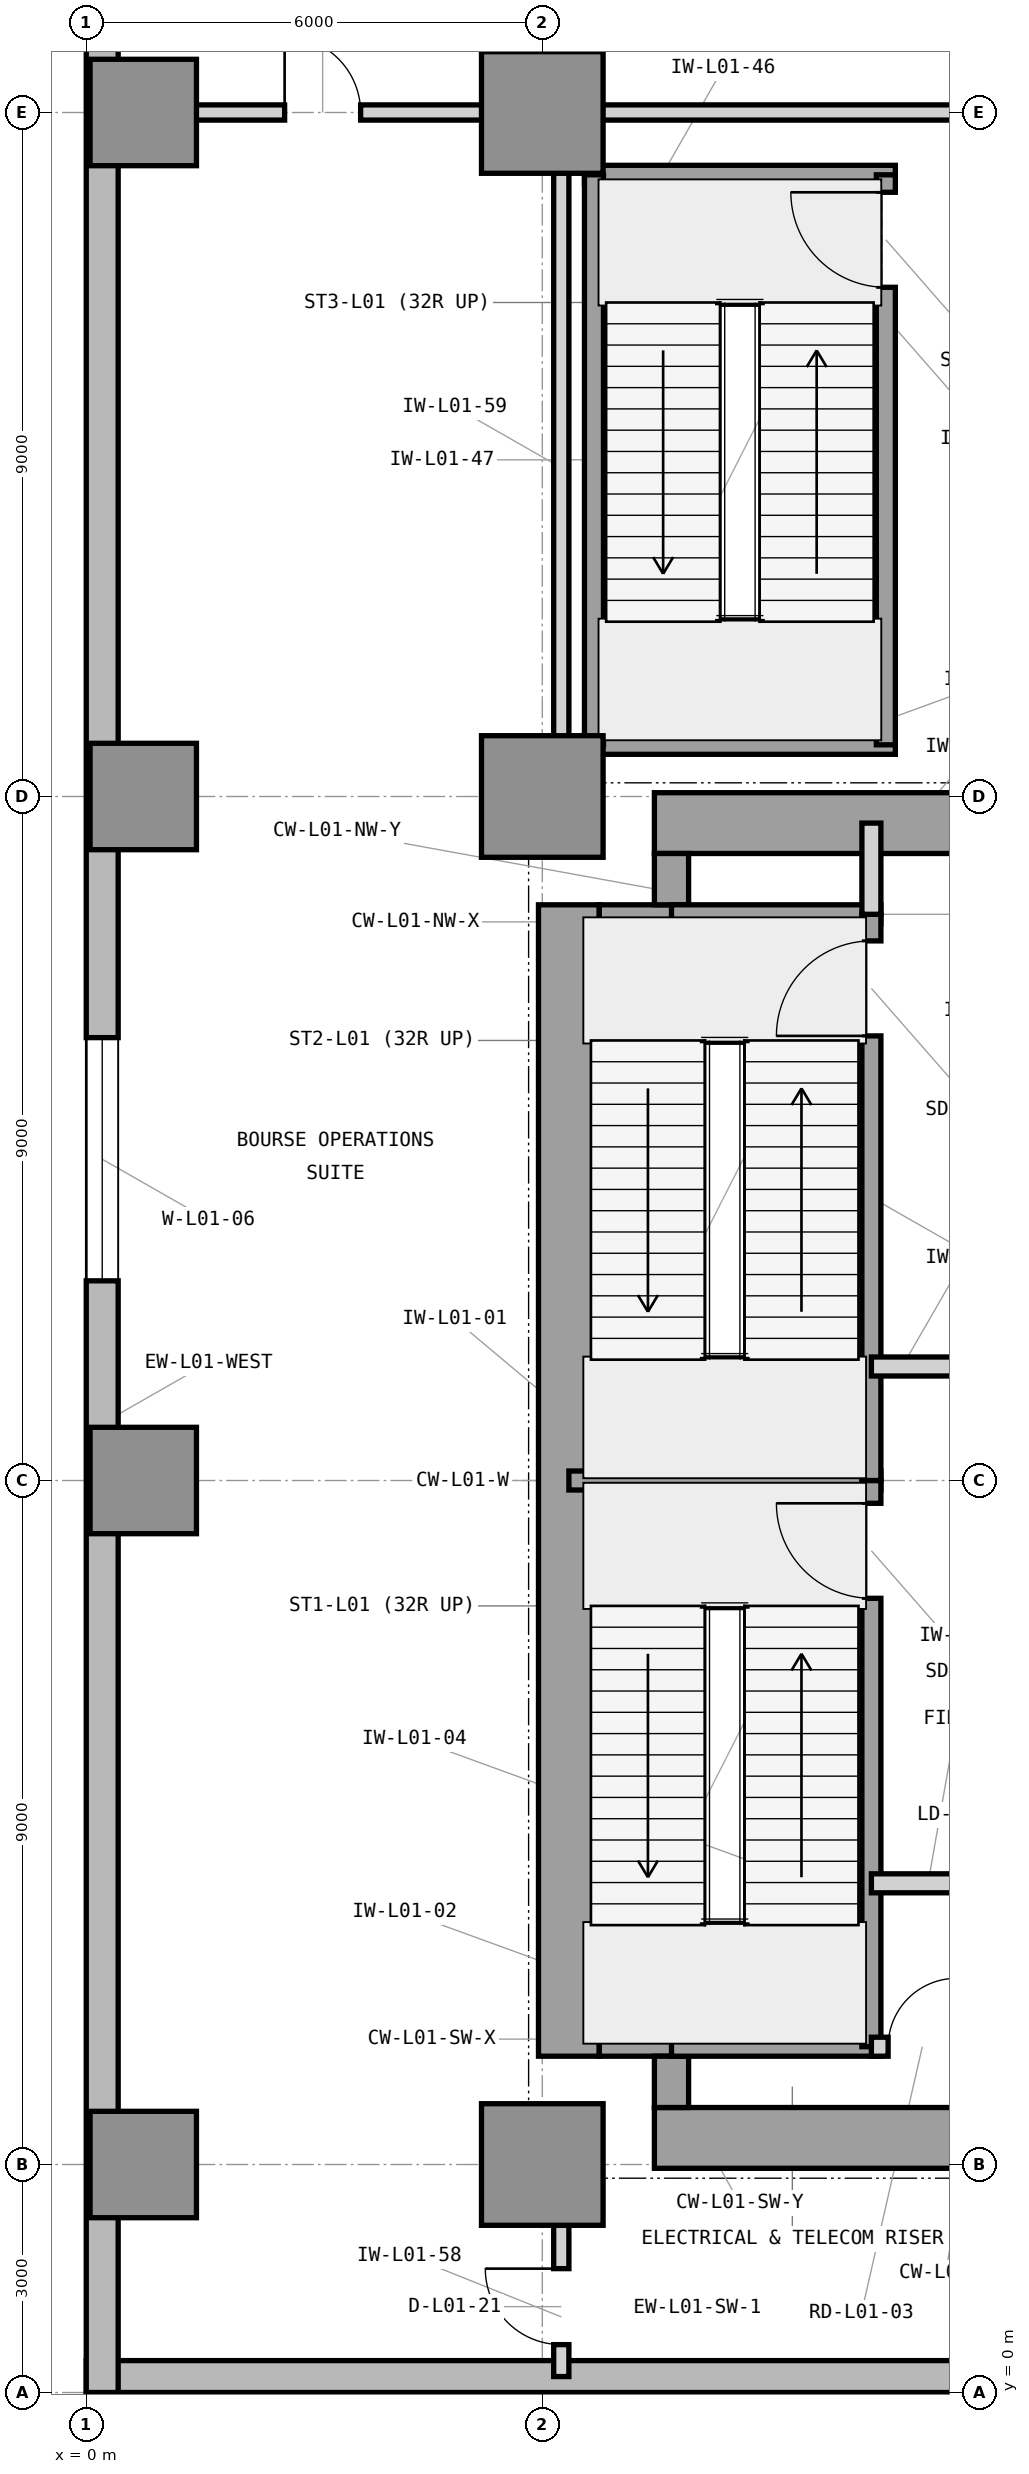
"""IFC4 building model, lengths in metres.
Left out: names, types, materials, properties, quantities, classifications, styles, units other than length and angle.
Written with IfcOpenShell. Run it as: python <this file> out.ifc"""

import sys

from ifc_helpers import new_model, si_unit, direction, frame, frame_2d, origin, origin_2d, place, context, subcontext, project, spatial, rectangle, extrude, element, fill, save


model = new_model("IFC4")
c1 = context("Model", 3, precision=1e-05, world=origin(), true_north=direction((0.0, 1.0)))
c2 = subcontext(c1, "Body", "Model", "MODEL_VIEW")
j1 = project(units=[si_unit("LENGTHUNIT", "METRE"), si_unit("PLANEANGLEUNIT", "RADIAN")], contexts=[c1])
p1 = place(None, origin())
s1 = spatial("IfcSite", under=j1, at=p1, CompositionType="ELEMENT")
p2 = place(p1, origin())
s2 = spatial("IfcBuilding", under=s1, at=p2, CompositionType="ELEMENT")
p3 = place(p2, frame((0.0, 0.0, 5.4)))
s3 = spatial("IfcBuildingStorey", under=s2, at=p3, CompositionType="ELEMENT", Elevation=5.4)
p4 = place(p3, frame((7.475, 3.35, 0.0), z_axis=(0.0, 0.0, 1.0), x_axis=(1.0, 0.0, 0.0)))
e1 = element("IfcWall", 1, at=p4, inside=s3, PredefinedType="SHEAR", context=c2, shape_type="SweptSolid", body=[
    extrude(rectangle(XDim=16.575, YDim=0.8, at=frame_2d((8.288, 0.0))), origin(), (0.0, 0.0, 1.0), 5.4),
])
p5 = place(p3, frame((6.35, 4.425, 0.0), z_axis=(0.0, 0.0, 1.0), x_axis=(0.0, 1.0, 0.0)))
e2 = element("IfcWall", 2, at=p5, inside=s3, PredefinedType="SHEAR", context=c2, shape_type="SweptSolid", body=[
    extrude(rectangle(XDim=15.15, YDim=0.8, at=frame_2d((7.575, 0.0))), origin(), (0.0, 0.0, 1.0), 5.4),
])
p6 = place(p3, frame((7.475, 20.65, 0.0), z_axis=(0.0, 0.0, 1.0), x_axis=(1.0, 0.0, 0.0)))
e3 = element("IfcWall", 3, at=p6, inside=s3, PredefinedType="SHEAR", context=c2, shape_type="SweptSolid", body=[
    extrude(rectangle(XDim=12.325, YDim=0.8, at=frame_2d((6.163, 0.0))), origin(), (0.0, 0.0, 1.0), 5.4),
])
p7 = place(p3, frame((6.75, 4.65, 0.0), z_axis=(0.0, 0.0, 1.0), x_axis=(1.0, 0.0, 0.0)))
e4 = element("IfcWall", 4, at=p7, inside=s3, PredefinedType="SHEAR", context=c2, shape_type="SweptSolid", body=[
    extrude(rectangle(XDim=1.175, YDim=0.45, at=frame_2d((0.587, 0.0))), origin(), (0.0, 0.0, 1.0), 5.4),
])
p8 = place(p3, frame((7.7, 3.75, 0.0), z_axis=(0.0, 0.0, 1.0), x_axis=(0.0, 1.0, 0.0)))
e5 = element("IfcWall", 5, at=p8, inside=s3, PredefinedType="SHEAR", context=c2, shape_type="SweptSolid", body=[
    extrude(rectangle(XDim=0.675, YDim=0.45, at=frame_2d((0.337, 0.0))), origin(), (0.0, 0.0, 1.0), 5.4),
])
p9 = place(p3, frame((6.75, 19.35, 0.0), z_axis=(0.0, 0.0, 1.0), x_axis=(1.0, 0.0, 0.0)))
e6 = element("IfcWall", 6, at=p9, inside=s3, PredefinedType="SHEAR", context=c2, shape_type="SweptSolid", body=[
    extrude(rectangle(XDim=1.175, YDim=0.45, at=frame_2d((0.587, 0.0))), origin(), (0.0, 0.0, 1.0), 5.4),
])
p10 = place(p3, frame((7.7, 19.575, 0.0), z_axis=(0.0, 0.0, 1.0), x_axis=(0.0, 1.0, 0.0)))
e7 = element("IfcWall", 7, at=p10, inside=s3, PredefinedType="SHEAR", context=c2, shape_type="SweptSolid", body=[
    extrude(rectangle(XDim=0.675, YDim=0.45, at=frame_2d((0.337, 0.0))), origin(), (0.0, 0.0, 1.0), 5.4),
])
for number, where, z_axis, x_axis in (
    (8, (0.75, 3.0, 0.0), (0.0, 0.0, 1.0), (1.0, 0.0, 0.0)),
    (9, (0.75, 12.0, 0.0), (0.0, 0.0, 1.0), (1.0, 0.0, 0.0)),
    (10, (0.75, 21.0, 0.0), (0.0, 0.0, 1.0), (1.0, 0.0, 0.0)),
    (11, (0.75, 30.0, 0.0), (0.0, 0.0, 1.0), (1.0, 0.0, 0.0)),
):
    element("IfcColumn", number, at=place(p3, frame(where, z_axis=z_axis, x_axis=x_axis)), inside=s3, PredefinedType="COLUMN", context=c2, shape_type="SweptSolid", body=[
        extrude(rectangle(XDim=1.4, YDim=1.4, at=origin_2d()), origin(), (0.0, 0.0, 1.0), 5.4),
    ])
for number, where, z_axis, x_axis in (
    (12, (6.0, 3.0, 0.0), (0.0, 0.0, 1.0), (1.0, 0.0, 0.0)),
    (13, (6.0, 21.0, 0.0), (0.0, 0.0, 1.0), (1.0, 0.0, 0.0)),
    (14, (6.0, 30.0, 0.0), (0.0, 0.0, 1.0), (1.0, 0.0, 0.0)),
):
    element("IfcColumn", number, at=place(p3, frame(where, z_axis=z_axis, x_axis=x_axis)), inside=s3, PredefinedType="COLUMN", context=c2, shape_type="SweptSolid", body=[
        extrude(rectangle(XDim=1.6, YDim=1.6, at=origin_2d()), origin(), (0.0, 0.0, 1.0), 5.4),
    ])
p11 = place(p3, frame((0.0, 0.21, 0.0), z_axis=(0.0, 0.0, 1.0), x_axis=(1.0, 0.0, 0.0)))
e15 = element("IfcWall", 15, at=p11, inside=s3, PredefinedType="STANDARD", context=c2, shape_type="SweptSolid", body=[
    extrude(rectangle(XDim=16.08, YDim=0.42, at=frame_2d((8.04, 0.0))), origin(), (0.0, 0.0, 1.0), 5.1),
])
p12 = place(p3, frame((0.21, 51.0, 0.0), z_axis=(0.0, 0.0, 1.0), x_axis=(0.0, -1.0, 0.0)))
e16 = element("IfcWall", 16, at=p12, inside=s3, PredefinedType="STANDARD", context=c2, shape_type="SweptSolid", body=[
    extrude(rectangle(XDim=51.0, YDim=0.42, at=frame_2d((25.5, 0.0))), origin(), (0.0, 0.0, 1.0), 5.1),
])
p13 = place(p12, frame((33.173, 0.0, 0.9)))
e17 = element("IfcOpeningElement", 17, at=p13, cuts=e16, PredefinedType="OPENING", context=c2, shape_type="SweptSolid", body=[
    extrude(rectangle(XDim=3.2, YDim=3.1, at=frame_2d((1.6, 1.55))), frame((0.0, 0.22, 0.0), z_axis=(0.0, -1.0, 0.0), x_axis=(1.0, 0.0, 0.0)), (0.0, 0.0, 1.0), 0.44),
])
p14 = place(p3, frame((6.35, 12.0, 0.0), z_axis=(0.0, 0.0, 1.0), x_axis=(1.0, 0.0, 0.0)))
e18 = element("IfcWall", 18, at=p14, inside=s3, PredefinedType="SHEAR", context=c2, shape_type="SweptSolid", body=[
    extrude(rectangle(XDim=4.105, YDim=0.25, at=frame_2d((2.052, 0.0))), origin(), (0.0, 0.0, 1.0), 5.4),
])
for number, where, z_axis, x_axis in (
    (19, (7.7, 4.55, 0.0), (0.0, 0.0, 1.0), (1.0, 0.0, 0.0)),
    (20, (7.7, 19.45, 0.0), (0.0, 0.0, 1.0), (1.0, 0.0, 0.0)),
):
    element("IfcWall", number, at=place(p3, frame(where, z_axis=z_axis, x_axis=x_axis)), inside=s3, PredefinedType="SHEAR", context=c2, shape_type="SweptSolid", body=[
        extrude(rectangle(XDim=2.755, YDim=0.25, at=frame_2d((1.377, 0.0))), origin(), (0.0, 0.0, 1.0), 5.4),
    ])
p15 = place(p3, frame((10.33, 4.55, 0.0), z_axis=(0.0, 0.0, 1.0), x_axis=(0.0, 1.0, 0.0)))
e21 = element("IfcWall", 21, at=p15, inside=s3, PredefinedType="SHEAR", context=c2, shape_type="SweptSolid", body=[
    extrude(rectangle(XDim=7.45, YDim=0.25, at=frame_2d((3.725, 0.0))), origin(), (0.0, 0.0, 1.0), 5.4),
])
p16 = place(p15, frame((5.9, 0.0, 0.0)))
e22 = element("IfcOpeningElement", 22, at=p16, cuts=e21, PredefinedType="OPENING", context=c2, shape_type="SweptSolid", body=[
    extrude(rectangle(XDim=1.25, YDim=2.2, at=frame_2d((0.625, 1.1))), frame((0.0, 0.135, 0.0), z_axis=(0.0, -1.0, 0.0), x_axis=(1.0, 0.0, 0.0)), (0.0, 0.0, 1.0), 0.27),
])
p17 = place(p3, frame((10.33, 12.0, 0.0), z_axis=(0.0, 0.0, 1.0), x_axis=(0.0, 1.0, 0.0)))
e23 = element("IfcWall", 23, at=p17, inside=s3, PredefinedType="SHEAR", context=c2, shape_type="SweptSolid", body=[
    extrude(rectangle(XDim=7.45, YDim=0.25, at=frame_2d((3.725, 0.0))), origin(), (0.0, 0.0, 1.0), 5.4),
])
p18 = place(p17, frame((5.85, 0.0, 0.0)))
e24 = element("IfcOpeningElement", 24, at=p18, cuts=e23, PredefinedType="OPENING", context=c2, shape_type="SweptSolid", body=[
    extrude(rectangle(XDim=1.25, YDim=2.2, at=frame_2d((0.625, 1.1))), frame((0.0, 0.135, 0.0), z_axis=(0.0, -1.0, 0.0), x_axis=(1.0, 0.0, 0.0)), (0.0, 0.0, 1.0), 0.27),
])
p19 = place(p3, frame((10.33, 4.55, 0.0), z_axis=(0.0, 0.0, 1.0), x_axis=(1.0, 0.0, 0.0)))
e25 = element("IfcWall", 25, at=p19, inside=s3, PredefinedType="PARTITIONING", context=c2, shape_type="SweptSolid", body=[
    extrude(rectangle(XDim=1.49, YDim=0.25, at=frame_2d((0.745, 0.0))), origin(), (0.0, 0.0, 1.0), 5.09),
])
p20 = place(p19, frame((0.22, 0.0, 0.0)))
e26 = element("IfcOpeningElement", 26, at=p20, cuts=e25, PredefinedType="OPENING", context=c2, shape_type="SweptSolid", body=[
    extrude(rectangle(XDim=0.9, YDim=2.1, at=frame_2d((0.45, 1.05))), frame((0.0, 0.135, 0.0), z_axis=(0.0, -1.0, 0.0), x_axis=(1.0, 0.0, 0.0)), (0.0, 0.0, 1.0), 0.27),
])
p21 = place(p3, frame((10.33, 19.45, 0.0), z_axis=(0.0, 0.0, 1.0), x_axis=(0.0, 1.0, 0.0)))
e27 = element("IfcWall", 27, at=p21, inside=s3, PredefinedType="PARTITIONING", context=c2, shape_type="SweptSolid", body=[
    extrude(rectangle(XDim=1.2, YDim=0.25, at=frame_2d((0.6, 0.0))), origin(), (0.0, 0.0, 1.0), 4.234),
])
p22 = place(p3, frame((10.33, 13.5, 0.0), z_axis=(0.0, 0.0, 1.0), x_axis=(1.0, 0.0, 0.0)))
e28 = element("IfcWall", 28, at=p22, inside=s3, PredefinedType="PARTITIONING", context=c2, shape_type="SweptSolid", body=[
    extrude(rectangle(XDim=1.62, YDim=0.25, at=frame_2d((0.81, 0.0))), origin(), (0.0, 0.0, 1.0), 4.473),
])
p23 = place(p3, frame((10.33, 6.7, 0.0), z_axis=(0.0, 0.0, 1.0), x_axis=(1.0, 0.0, 0.0)))
e29 = element("IfcWall", 29, at=p23, inside=s3, PredefinedType="PARTITIONING", context=c2, shape_type="SweptSolid", body=[
    extrude(rectangle(XDim=1.49, YDim=0.25, at=frame_2d((0.745, 0.0))), origin(), (0.0, 0.0, 1.0), 4.473),
])
for number, where, z_axis, x_axis in (
    (30, (6.555, 21.68, 0.0), (0.0, 0.0, 1.0), (1.0, 0.0, 0.0)),
    (31, (6.555, 29.18, 0.0), (0.0, 0.0, 1.0), (1.0, 0.0, 0.0)),
):
    element("IfcWall", number, at=place(p3, frame(where, z_axis=z_axis, x_axis=x_axis)), inside=s3, PredefinedType="SHEAR", context=c2, shape_type="SweptSolid", body=[
        extrude(rectangle(XDim=4.09, YDim=0.25, at=frame_2d((2.045, 0.0))), origin(), (0.0, 0.0, 1.0), 5.4),
    ])
p24 = place(p3, frame((6.68, 21.68, 0.0), z_axis=(0.0, 0.0, 1.0), x_axis=(0.0, 1.0, 0.0)))
e32 = element("IfcWall", 32, at=p24, inside=s3, PredefinedType="SHEAR", context=c2, shape_type="SweptSolid", body=[
    extrude(rectangle(XDim=7.5, YDim=0.25, at=frame_2d((3.75, 0.0))), origin(), (0.0, 0.0, 1.0), 5.4),
])
p25 = place(p3, frame((10.52, 21.68, 0.0), z_axis=(0.0, 0.0, 1.0), x_axis=(0.0, 1.0, 0.0)))
e33 = element("IfcWall", 33, at=p25, inside=s3, PredefinedType="SHEAR", context=c2, shape_type="SweptSolid", body=[
    extrude(rectangle(XDim=7.5, YDim=0.25, at=frame_2d((3.75, 0.0))), origin(), (0.0, 0.0, 1.0), 5.4),
])
p26 = place(p25, frame((6.02, 0.0, 0.0)))
e34 = element("IfcOpeningElement", 34, at=p26, cuts=e33, PredefinedType="OPENING", context=c2, shape_type="SweptSolid", body=[
    extrude(rectangle(XDim=1.25, YDim=2.2, at=frame_2d((0.625, 1.1))), frame((0.0, 0.135, 0.0), z_axis=(0.0, -1.0, 0.0), x_axis=(1.0, 0.0, 0.0)), (0.0, 0.0, 1.0), 0.27),
])
p27 = place(p3, frame((0.21, 30.0, 0.0), z_axis=(0.0, 0.0, 1.0), x_axis=(1.0, 0.0, 0.0)))
e35 = element("IfcWall", 35, at=p27, inside=s3, PredefinedType="PARTITIONING", context=c2, shape_type="SweptSolid", body=[
    extrude(rectangle(XDim=17.44, YDim=0.2, at=frame_2d((8.72, 0.0))), origin(), (0.0, 0.0, 1.0), 4.234),
])
p28 = place(p27, frame((2.4, 0.0, 0.0)))
e36 = element("IfcOpeningElement", 36, at=p28, cuts=e35, PredefinedType="OPENING", context=c2, shape_type="SweptSolid", body=[
    extrude(rectangle(XDim=1.0, YDim=2.15, at=frame_2d((0.5, 1.075))), frame((0.0, 0.11, 0.0), z_axis=(0.0, -1.0, 0.0), x_axis=(1.0, 0.0, 0.0)), (0.0, 0.0, 1.0), 0.22),
])
p29 = place(p27, frame((11.2, 0.0, 0.0)))
e37 = element("IfcOpeningElement", 37, at=p29, cuts=e35, PredefinedType="OPENING", context=c2, shape_type="SweptSolid", body=[
    extrude(rectangle(XDim=2.0, YDim=2.5, at=frame_2d((1.0, 1.25))), frame((0.0, 0.11, 0.0), z_axis=(0.0, -1.0, 0.0), x_axis=(1.0, 0.0, 0.0)), (0.0, 0.0, 1.0), 0.22),
])
p30 = place(p3, frame((6.25, 0.21, 0.0), z_axis=(0.0, 0.0, 1.0), x_axis=(0.0, 1.0, 0.0)))
e38 = element("IfcWall", 38, at=p30, inside=s3, PredefinedType="PARTITIONING", context=c2, shape_type="SweptSolid", body=[
    extrude(rectangle(XDim=3.14, YDim=0.2, at=frame_2d((1.57, 0.0))), origin(), (0.0, 0.0, 1.0), 5.09),
])
p31 = place(p30, frame((0.42, 0.0, 0.0)))
e39 = element("IfcOpeningElement", 39, at=p31, cuts=e38, PredefinedType="OPENING", context=c2, shape_type="SweptSolid", body=[
    extrude(rectangle(XDim=1.0, YDim=2.15, at=frame_2d((0.5, 1.075))), frame((0.0, 0.11, 0.0), z_axis=(0.0, -1.0, 0.0), x_axis=(1.0, 0.0, 0.0)), (0.0, 0.0, 1.0), 0.22),
])
p32 = place(p3, frame((6.25, 20.65, 0.0), z_axis=(0.0, 0.0, 1.0), x_axis=(0.0, 1.0, 0.0)))
e40 = element("IfcWall", 40, at=p32, inside=s3, PredefinedType="PARTITIONING", context=c2, shape_type="SweptSolid", body=[
    extrude(rectangle(XDim=9.35, YDim=0.2, at=frame_2d((4.675, 0.0))), origin(), (0.0, 0.0, 1.0), 5.09),
])
p33 = place(p13, origin())
e41 = element("IfcWindow", 41, at=p33, inside=s3, PartitioningType="SINGLE_PANEL", PredefinedType="WINDOW", context=c2, shape_type="SweptSolid", body=[
    extrude(rectangle(XDim=3.2, YDim=3.1, at=frame_2d((1.6, 1.55))), frame((0.0, 0.11, 0.0), z_axis=(0.0, -1.0, 0.0), x_axis=(1.0, 0.0, 0.0)), (0.0, 0.0, 1.0), 0.06),
])
fill(e17, e41)
p34 = place(p16, origin())
e42 = element("IfcDoor", 42, at=p34, inside=s3, OperationType="SINGLE_SWING_RIGHT", PredefinedType="DOOR", context=c2, shape_type="SweptSolid", body=[
    extrude(rectangle(XDim=1.25, YDim=2.2, at=frame_2d((0.625, 1.1))), frame((0.0, 0.025, 0.0), z_axis=(0.0, -1.0, 0.0), x_axis=(1.0, 0.0, 0.0)), (0.0, 0.0, 1.0), 0.05),
])
fill(e22, e42)
p35 = place(p18, origin())
e43 = element("IfcDoor", 43, at=p35, inside=s3, OperationType="SINGLE_SWING_LEFT", PredefinedType="DOOR", context=c2, shape_type="SweptSolid", body=[
    extrude(rectangle(XDim=1.25, YDim=2.2, at=frame_2d((0.625, 1.1))), frame((0.0, 0.025, 0.0), z_axis=(0.0, -1.0, 0.0), x_axis=(1.0, 0.0, 0.0)), (0.0, 0.0, 1.0), 0.05),
])
fill(e24, e43)
p36 = place(p20, origin())
e44 = element("IfcDoor", 44, at=p36, inside=s3, OperationType="SINGLE_SWING_RIGHT", PredefinedType="TRAPDOOR", context=c2, shape_type="SweptSolid", body=[
    extrude(rectangle(XDim=0.9, YDim=2.1, at=frame_2d((0.45, 1.05))), frame((0.0, 0.025, 0.0), z_axis=(0.0, -1.0, 0.0), x_axis=(1.0, 0.0, 0.0)), (0.0, 0.0, 1.0), 0.05),
])
fill(e26, e44)
p37 = place(p26, origin())
e45 = element("IfcDoor", 45, at=p37, inside=s3, OperationType="SINGLE_SWING_RIGHT", PredefinedType="DOOR", context=c2, shape_type="SweptSolid", body=[
    extrude(rectangle(XDim=1.25, YDim=2.2, at=frame_2d((0.625, 1.1))), frame((0.0, 0.025, 0.0), z_axis=(0.0, -1.0, 0.0), x_axis=(1.0, 0.0, 0.0)), (0.0, 0.0, 1.0), 0.05),
])
fill(e34, e45)
p38 = place(p28, origin())
e46 = element("IfcDoor", 46, at=p38, inside=s3, OperationType="SINGLE_SWING_LEFT", PredefinedType="DOOR", context=c2, shape_type="SweptSolid", body=[
    extrude(rectangle(XDim=1.0, YDim=2.15, at=frame_2d((0.5, 1.075))), frame((0.0, 0.025, 0.0), z_axis=(0.0, -1.0, 0.0), x_axis=(1.0, 0.0, 0.0)), (0.0, 0.0, 1.0), 0.05),
])
fill(e36, e46)
p39 = place(p31, origin())
e47 = element("IfcDoor", 47, at=p39, inside=s3, OperationType="SINGLE_SWING_RIGHT", PredefinedType="DOOR", context=c2, shape_type="SweptSolid", body=[
    extrude(rectangle(XDim=1.0, YDim=2.15, at=frame_2d((0.5, 1.075))), frame((0.0, 0.025, 0.0), z_axis=(0.0, -1.0, 0.0), x_axis=(1.0, 0.0, 0.0)), (0.0, 0.0, 1.0), 0.05),
])
fill(e39, e47)
save(model, sys.argv[1])
